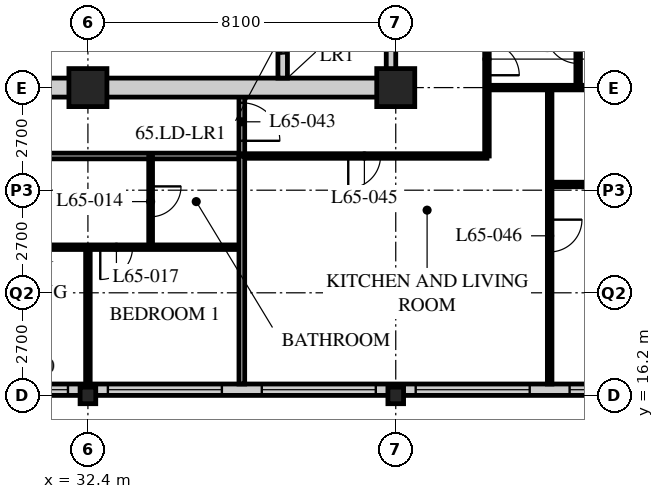
"""IFC4 building model, lengths in metres.
Left out: names, types, materials, properties, quantities, classifications, styles, units other than length and angle.
Written with IfcOpenShell. Run it as: python <this file> out.ifc"""

import sys

from ifc_helpers import new_model, si_unit, direction, frame, frame_2d, origin, origin_2d, place, context, subcontext, project, spatial, rectangle, hollow_rectangle, i_section, extrude, element, fill, save


model = new_model("IFC4")
c1 = context("Model", 3, precision=1e-05, world=origin(), true_north=direction((0.0, 1.0)))
c2 = subcontext(c1, "Body", "Model", "MODEL_VIEW")
j1 = project(units=[si_unit("LENGTHUNIT", "METRE"), si_unit("PLANEANGLEUNIT", "RADIAN")], contexts=[c1])
p1 = place(None, origin())
s1 = spatial("IfcSite", under=j1, at=p1, CompositionType="ELEMENT")
p2 = place(p1, origin())
s2 = spatial("IfcBuilding", under=s1, at=p2, CompositionType="ELEMENT")
p3 = place(p2, frame((0.0, 0.0, 254.1)))
s3 = spatial("IfcBuildingStorey", under=s2, at=p3, CompositionType="ELEMENT", Elevation=254.1)
p4 = place(p3, frame((32.4, 16.2, 0.0), z_axis=(0.0, 0.0, 1.0), x_axis=(1.0, 0.0, 0.0)))
e1 = element("IfcColumn", 1, at=p4, inside=s3, PredefinedType="COLUMN", context=c2, shape_type="SweptSolid", body=[
    extrude(i_section(OverallWidth=0.412, OverallDepth=0.437, WebThickness=0.036, FlangeThickness=0.058, FilletRadius=0.015, at=origin_2d()), origin(), (0.0, 0.0, 1.0), 3.9),
])
p5 = place(p3, frame((32.4, 24.3, 0.0), z_axis=(0.0, 0.0, 1.0), x_axis=(1.0, 0.0, 0.0)))
e2 = element("IfcColumn", 2, at=p5, inside=s3, PredefinedType="COLUMN", context=c2, shape_type="SweptSolid", body=[
    extrude(hollow_rectangle(XDim=1.0, YDim=1.0, WallThickness=0.1, at=origin_2d()), origin(), (0.0, 0.0, 1.0), 3.9),
])
p6 = place(p3, frame((40.5, 16.2, 0.0), z_axis=(0.0, 0.0, 1.0), x_axis=(1.0, 0.0, 0.0)))
e3 = element("IfcColumn", 3, at=p6, inside=s3, PredefinedType="COLUMN", context=c2, shape_type="SweptSolid", body=[
    extrude(i_section(OverallWidth=0.412, OverallDepth=0.437, WebThickness=0.036, FlangeThickness=0.058, FilletRadius=0.015, at=origin_2d()), origin(), (0.0, 0.0, 1.0), 3.9),
])
p7 = place(p3, frame((40.5, 24.3, 0.0), z_axis=(0.0, 0.0, 1.0), x_axis=(1.0, 0.0, 0.0)))
e4 = element("IfcColumn", 4, at=p7, inside=s3, PredefinedType="COLUMN", context=c2, shape_type="SweptSolid", body=[
    extrude(hollow_rectangle(XDim=1.0, YDim=1.0, WallThickness=0.1, at=origin_2d()), origin(), (0.0, 0.0, 1.0), 3.9),
])
p8 = place(p3, frame((8.4, 16.35, 0.0), z_axis=(0.0, 0.0, 1.0), x_axis=(1.0, 0.0, 0.0)))
e5 = element("IfcWall", 5, at=p8, inside=s3, PredefinedType="SOLIDWALL", context=c2, shape_type="SweptSolid", body=[
    extrude(rectangle(XDim=40.2, YDim=0.3, at=frame_2d((20.1, 0.0))), origin(), (0.0, 0.0, 1.0), 3.69),
])
p9 = place(p8, frame((0.225, 0.0, 0.6)))
e6 = element("IfcOpeningElement", 6, at=p9, cuts=e5, PredefinedType="OPENING", context=c2, shape_type="SweptSolid", body=[
    extrude(rectangle(XDim=3.0, YDim=2.4, at=frame_2d((1.5, 1.2))), frame((0.0, 0.16, 0.0), z_axis=(0.0, -1.0, 0.0), x_axis=(1.0, 0.0, 0.0)), (0.0, 0.0, 1.0), 0.32),
])
p10 = place(p8, frame((4.275, 0.0, 0.6)))
e7 = element("IfcOpeningElement", 7, at=p10, cuts=e5, PredefinedType="OPENING", context=c2, shape_type="SweptSolid", body=[
    extrude(rectangle(XDim=3.0, YDim=2.4, at=frame_2d((1.5, 1.2))), frame((0.0, 0.16, 0.0), z_axis=(0.0, -1.0, 0.0), x_axis=(1.0, 0.0, 0.0)), (0.0, 0.0, 1.0), 0.32),
])
p11 = place(p8, frame((8.325, 0.0, 0.6)))
e8 = element("IfcOpeningElement", 8, at=p11, cuts=e5, PredefinedType="OPENING", context=c2, shape_type="SweptSolid", body=[
    extrude(rectangle(XDim=3.0, YDim=2.4, at=frame_2d((1.5, 1.2))), frame((0.0, 0.16, 0.0), z_axis=(0.0, -1.0, 0.0), x_axis=(1.0, 0.0, 0.0)), (0.0, 0.0, 1.0), 0.32),
])
p12 = place(p8, frame((12.375, 0.0, 0.6)))
e9 = element("IfcOpeningElement", 9, at=p12, cuts=e5, PredefinedType="OPENING", context=c2, shape_type="SweptSolid", body=[
    extrude(rectangle(XDim=3.0, YDim=2.4, at=frame_2d((1.5, 1.2))), frame((0.0, 0.16, 0.0), z_axis=(0.0, -1.0, 0.0), x_axis=(1.0, 0.0, 0.0)), (0.0, 0.0, 1.0), 0.32),
])
p13 = place(p8, frame((16.425, 0.0, 0.6)))
e10 = element("IfcOpeningElement", 10, at=p13, cuts=e5, PredefinedType="OPENING", context=c2, shape_type="SweptSolid", body=[
    extrude(rectangle(XDim=3.0, YDim=2.4, at=frame_2d((1.5, 1.2))), frame((0.0, 0.16, 0.0), z_axis=(0.0, -1.0, 0.0), x_axis=(1.0, 0.0, 0.0)), (0.0, 0.0, 1.0), 0.32),
])
p14 = place(p8, frame((20.475, 0.0, 0.6)))
e11 = element("IfcOpeningElement", 11, at=p14, cuts=e5, PredefinedType="OPENING", context=c2, shape_type="SweptSolid", body=[
    extrude(rectangle(XDim=3.0, YDim=2.4, at=frame_2d((1.5, 1.2))), frame((0.0, 0.16, 0.0), z_axis=(0.0, -1.0, 0.0), x_axis=(1.0, 0.0, 0.0)), (0.0, 0.0, 1.0), 0.32),
])
p15 = place(p8, frame((24.525, 0.0, 0.6)))
e12 = element("IfcOpeningElement", 12, at=p15, cuts=e5, PredefinedType="OPENING", context=c2, shape_type="SweptSolid", body=[
    extrude(rectangle(XDim=3.0, YDim=2.4, at=frame_2d((1.5, 1.2))), frame((0.0, 0.16, 0.0), z_axis=(0.0, -1.0, 0.0), x_axis=(1.0, 0.0, 0.0)), (0.0, 0.0, 1.0), 0.32),
])
p16 = place(p8, frame((28.575, 0.0, 0.6)))
e13 = element("IfcOpeningElement", 13, at=p16, cuts=e5, PredefinedType="OPENING", context=c2, shape_type="SweptSolid", body=[
    extrude(rectangle(XDim=3.0, YDim=2.4, at=frame_2d((1.5, 1.2))), frame((0.0, 0.16, 0.0), z_axis=(0.0, -1.0, 0.0), x_axis=(1.0, 0.0, 0.0)), (0.0, 0.0, 1.0), 0.32),
])
p17 = place(p8, frame((32.625, 0.0, 0.6)))
e14 = element("IfcOpeningElement", 14, at=p17, cuts=e5, PredefinedType="OPENING", context=c2, shape_type="SweptSolid", body=[
    extrude(rectangle(XDim=3.0, YDim=2.4, at=frame_2d((1.5, 1.2))), frame((0.0, 0.16, 0.0), z_axis=(0.0, -1.0, 0.0), x_axis=(1.0, 0.0, 0.0)), (0.0, 0.0, 1.0), 0.32),
])
p18 = place(p8, frame((36.675, 0.0, 0.6)))
e15 = element("IfcOpeningElement", 15, at=p18, cuts=e5, PredefinedType="OPENING", context=c2, shape_type="SweptSolid", body=[
    extrude(rectangle(XDim=3.0, YDim=2.4, at=frame_2d((1.5, 1.2))), frame((0.0, 0.16, 0.0), z_axis=(0.0, -1.0, 0.0), x_axis=(1.0, 0.0, 0.0)), (0.0, 0.0, 1.0), 0.32),
])
p19 = place(p3, frame((12.15, 22.5, 0.0), z_axis=(0.0, 0.0, 1.0), x_axis=(1.0, 0.0, 0.0)))
e16 = element("IfcWall", 16, at=p19, inside=s3, PredefinedType="PARTITIONING", context=c2, shape_type="SweptSolid", body=[
    extrude(rectangle(XDim=24.3, YDim=0.15, at=frame_2d((12.15, 0.0))), origin(), (0.0, 0.0, 1.0), 3.69),
])
p20 = place(p19, frame((6.4, 0.0, 0.0)))
e17 = element("IfcOpeningElement", 17, at=p20, cuts=e16, PredefinedType="OPENING", context=c2, shape_type="SweptSolid", body=[
    extrude(rectangle(XDim=1.0, YDim=2.1, at=frame_2d((0.5, 1.05))), frame((0.0, 0.085, 0.0), z_axis=(0.0, -1.0, 0.0), x_axis=(1.0, 0.0, 0.0)), (0.0, 0.0, 1.0), 0.17),
])
p21 = place(p19, frame((8.5, 0.0, 0.0)))
e18 = element("IfcOpeningElement", 18, at=p21, cuts=e16, PredefinedType="OPENING", context=c2, shape_type="SweptSolid", body=[
    extrude(rectangle(XDim=1.0, YDim=2.1, at=frame_2d((0.5, 1.05))), frame((0.0, 0.085, 0.0), z_axis=(0.0, -1.0, 0.0), x_axis=(1.0, 0.0, 0.0)), (0.0, 0.0, 1.0), 0.17),
])
p22 = place(p19, frame((16.6, 0.0, 0.0)))
e19 = element("IfcOpeningElement", 19, at=p22, cuts=e16, PredefinedType="OPENING", context=c2, shape_type="SweptSolid", body=[
    extrude(rectangle(XDim=1.0, YDim=2.1, at=frame_2d((0.5, 1.05))), frame((0.0, 0.085, 0.0), z_axis=(0.0, -1.0, 0.0), x_axis=(1.0, 0.0, 0.0)), (0.0, 0.0, 1.0), 0.17),
])
p23 = place(p19, frame((2.625, 0.0, 0.0)))
e20 = element("IfcOpeningElement", 20, at=p23, cuts=e16, PredefinedType="OPENING", context=c2, shape_type="SweptSolid", body=[
    extrude(rectangle(XDim=1.0, YDim=2.1, at=frame_2d((0.5, 1.05))), frame((0.0, 0.085, 0.0), z_axis=(0.0, -1.0, 0.0), x_axis=(1.0, 0.0, 0.0)), (0.0, 0.0, 1.0), 0.17),
])
p24 = place(p3, frame((36.45, 22.5, 0.0), z_axis=(0.0, 0.0, 1.0), x_axis=(0.0, 1.0, 0.0)))
e21 = element("IfcWall", 21, at=p24, inside=s3, PredefinedType="PARTITIONING", context=c2, shape_type="SweptSolid", body=[
    extrude(rectangle(XDim=1.8, YDim=0.15, at=frame_2d((0.9, 0.0))), origin(), (0.0, 0.0, 1.0), 3.69),
])
p25 = place(p24, frame((0.4, 0.0, 0.0)))
e22 = element("IfcOpeningElement", 22, at=p25, cuts=e21, PredefinedType="OPENING", context=c2, shape_type="SweptSolid", body=[
    extrude(rectangle(XDim=1.0, YDim=2.1, at=frame_2d((0.5, 1.05))), frame((0.0, 0.085, 0.0), z_axis=(0.0, -1.0, 0.0), x_axis=(1.0, 0.0, 0.0)), (0.0, 0.0, 1.0), 0.17),
])
p26 = place(p3, frame((20.25, 20.1, 0.0), z_axis=(0.0, 0.0, 1.0), x_axis=(1.0, 0.0, 0.0)))
e23 = element("IfcWall", 23, at=p26, inside=s3, PredefinedType="PARTITIONING", context=c2, shape_type="SweptSolid", body=[
    extrude(rectangle(XDim=16.2, YDim=0.12, at=frame_2d((8.1, 0.0))), origin(), (0.0, 0.0, 1.0), 3.69),
])
p27 = place(p26, frame((0.975, 0.0, 0.0)))
e24 = element("IfcOpeningElement", 24, at=p27, cuts=e23, PredefinedType="OPENING", context=c2, shape_type="SweptSolid", body=[
    extrude(rectangle(XDim=0.85, YDim=2.1, at=frame_2d((0.425, 1.05))), frame((0.0, 0.07, 0.0), z_axis=(0.0, -1.0, 0.0), x_axis=(1.0, 0.0, 0.0)), (0.0, 0.0, 1.0), 0.14),
])
p28 = place(p26, frame((4.375, 0.0, 0.0)))
e25 = element("IfcOpeningElement", 25, at=p28, cuts=e23, PredefinedType="OPENING", context=c2, shape_type="SweptSolid", body=[
    extrude(rectangle(XDim=0.85, YDim=2.1, at=frame_2d((0.425, 1.05))), frame((0.0, 0.07, 0.0), z_axis=(0.0, -1.0, 0.0), x_axis=(1.0, 0.0, 0.0)), (0.0, 0.0, 1.0), 0.14),
])
p29 = place(p26, frame((9.075, 0.0, 0.0)))
e26 = element("IfcOpeningElement", 26, at=p29, cuts=e23, PredefinedType="OPENING", context=c2, shape_type="SweptSolid", body=[
    extrude(rectangle(XDim=0.85, YDim=2.1, at=frame_2d((0.425, 1.05))), frame((0.0, 0.07, 0.0), z_axis=(0.0, -1.0, 0.0), x_axis=(1.0, 0.0, 0.0)), (0.0, 0.0, 1.0), 0.14),
])
p30 = place(p26, frame((12.475, 0.0, 0.0)))
e27 = element("IfcOpeningElement", 27, at=p30, cuts=e23, PredefinedType="OPENING", context=c2, shape_type="SweptSolid", body=[
    extrude(rectangle(XDim=0.85, YDim=2.1, at=frame_2d((0.425, 1.05))), frame((0.0, 0.07, 0.0), z_axis=(0.0, -1.0, 0.0), x_axis=(1.0, 0.0, 0.0)), (0.0, 0.0, 1.0), 0.14),
])
p31 = place(p3, frame((34.05, 22.5, 0.0), z_axis=(0.0, 0.0, 1.0), x_axis=(0.0, -1.0, 0.0)))
e28 = element("IfcWall", 28, at=p31, inside=s3, PredefinedType="PARTITIONING", context=c2, shape_type="SweptSolid", body=[
    extrude(rectangle(XDim=2.4, YDim=0.1, at=frame_2d((1.2, 0.0))), origin(), (0.0, 0.0, 1.0), 3.69),
])
p32 = place(p31, frame((0.8, 0.0, 0.0)))
e29 = element("IfcOpeningElement", 29, at=p32, cuts=e28, PredefinedType="OPENING", context=c2, shape_type="SweptSolid", body=[
    extrude(rectangle(XDim=0.8, YDim=2.1, at=frame_2d((0.4, 1.05))), frame((0.0, 0.06, 0.0), z_axis=(0.0, -1.0, 0.0), x_axis=(1.0, 0.0, 0.0)), (0.0, 0.0, 1.0), 0.12),
])
p33 = place(p3, frame((32.4, 20.1, 0.0), z_axis=(0.0, 0.0, 1.0), x_axis=(0.0, -1.0, 0.0)))
e30 = element("IfcWall", 30, at=p33, inside=s3, PredefinedType="PARTITIONING", context=c2, shape_type="SweptSolid", body=[
    extrude(rectangle(XDim=3.6, YDim=0.12, at=frame_2d((1.8, 0.0))), origin(), (0.0, 0.0, 1.0), 3.078),
])
p34 = place(p3, frame((42.9, 22.5, 0.0), z_axis=(0.0, 0.0, 1.0), x_axis=(0.0, 1.0, 0.0)))
e31 = element("IfcWall", 31, at=p34, inside=s3, PredefinedType="PARTITIONING", context=c2, shape_type="SweptSolid", body=[
    extrude(rectangle(XDim=13.95, YDim=0.12, at=frame_2d((6.975, 0.0))), origin(), (0.0, 0.0, 1.0), 3.69),
])
p35 = place(p34, frame((2.125, 0.0, 0.0)))
e32 = element("IfcOpeningElement", 32, at=p35, cuts=e31, PredefinedType="OPENING", context=c2, shape_type="SweptSolid", body=[
    extrude(rectangle(XDim=0.85, YDim=2.1, at=frame_2d((0.425, 1.05))), frame((0.0, 0.07, 0.0), z_axis=(0.0, -1.0, 0.0), x_axis=(1.0, 0.0, 0.0)), (0.0, 0.0, 1.0), 0.14),
])
p36 = place(p34, frame((6.175, 0.0, 0.0)))
e33 = element("IfcOpeningElement", 33, at=p36, cuts=e31, PredefinedType="OPENING", context=c2, shape_type="SweptSolid", body=[
    extrude(rectangle(XDim=0.85, YDim=2.1, at=frame_2d((0.425, 1.05))), frame((0.0, 0.07, 0.0), z_axis=(0.0, -1.0, 0.0), x_axis=(1.0, 0.0, 0.0)), (0.0, 0.0, 1.0), 0.14),
])
p37 = place(p34, frame((10.225, 0.0, 0.0)))
e34 = element("IfcOpeningElement", 34, at=p37, cuts=e31, PredefinedType="OPENING", context=c2, shape_type="SweptSolid", body=[
    extrude(rectangle(XDim=0.85, YDim=2.1, at=frame_2d((0.425, 1.05))), frame((0.0, 0.07, 0.0), z_axis=(0.0, -1.0, 0.0), x_axis=(1.0, 0.0, 0.0)), (0.0, 0.0, 1.0), 0.14),
])
p38 = place(p3, frame((36.45, 22.5, 0.0), z_axis=(0.0, 0.0, 1.0), x_axis=(1.0, 0.0, 0.0)))
e35 = element("IfcWall", 35, at=p38, inside=s3, PredefinedType="PARTITIONING", context=c2, shape_type="SweptSolid", body=[
    extrude(rectangle(XDim=6.45, YDim=0.12, at=frame_2d((3.225, 0.0))), origin(), (0.0, 0.0, 1.0), 3.69),
])
p39 = place(p38, frame((2.8, 0.0, 0.0)))
e36 = element("IfcOpeningElement", 36, at=p39, cuts=e35, PredefinedType="OPENING", context=c2, shape_type="SweptSolid", body=[
    extrude(rectangle(XDim=0.85, YDim=2.1, at=frame_2d((0.425, 1.05))), frame((0.0, 0.07, 0.0), z_axis=(0.0, -1.0, 0.0), x_axis=(1.0, 0.0, 0.0)), (0.0, 0.0, 1.0), 0.14),
])
p40 = place(p3, frame((42.9, 24.3, 0.0), z_axis=(0.0, 0.0, 1.0), x_axis=(1.0, 0.0, 0.0)))
e37 = element("IfcWall", 37, at=p40, inside=s3, PredefinedType="PARTITIONING", context=c2, shape_type="SweptSolid", body=[
    extrude(rectangle(XDim=9.45, YDim=0.12, at=frame_2d((4.725, 0.0))), origin(), (0.0, 0.0, 1.0), 3.078),
])
p41 = place(p3, frame((36.45, 16.5, 0.0), z_axis=(0.0, 0.0, 1.0), x_axis=(0.0, 1.0, 0.0)))
e38 = element("IfcWall", 38, at=p41, inside=s3, PredefinedType="PARTITIONING", context=c2, shape_type="SweptSolid", body=[
    extrude(rectangle(XDim=6.0, YDim=0.15, at=frame_2d((3.0, 0.0))), origin(), (0.0, 0.0, 1.0), 3.69),
])
p42 = place(p3, frame((44.55, 16.5, 0.0), z_axis=(0.0, 0.0, 1.0), x_axis=(0.0, 1.0, 0.0)))
e39 = element("IfcWall", 39, at=p42, inside=s3, PredefinedType="PARTITIONING", context=c2, shape_type="SweptSolid", body=[
    extrude(rectangle(XDim=7.8, YDim=0.12, at=frame_2d((3.9, 0.0))), origin(), (0.0, 0.0, 1.0), 3.69),
])
p43 = place(p42, frame((3.475, 0.0, 0.0)))
e40 = element("IfcOpeningElement", 40, at=p43, cuts=e39, PredefinedType="OPENING", context=c2, shape_type="SweptSolid", body=[
    extrude(rectangle(XDim=0.85, YDim=2.1, at=frame_2d((0.425, 1.05))), frame((0.0, 0.07, 0.0), z_axis=(0.0, -1.0, 0.0), x_axis=(1.0, 0.0, 0.0)), (0.0, 0.0, 1.0), 0.14),
])
p44 = place(p3, frame((45.3, 24.3, 0.0), z_axis=(0.0, 0.0, 1.0), x_axis=(0.0, 1.0, 0.0)))
e41 = element("IfcWall", 41, at=p44, inside=s3, PredefinedType="PARTITIONING", context=c2, shape_type="SweptSolid", body=[
    extrude(rectangle(XDim=1.76, YDim=0.12, at=frame_2d((0.88, 0.0))), origin(), (0.0, 0.0, 1.0), 3.69),
])
p45 = place(p44, frame((0.635, 0.0, 0.0)))
e42 = element("IfcOpeningElement", 42, at=p45, cuts=e41, PredefinedType="OPENING", context=c2, shape_type="SweptSolid", body=[
    extrude(rectangle(XDim=0.85, YDim=2.1, at=frame_2d((0.425, 1.05))), frame((0.0, 0.07, 0.0), z_axis=(0.0, -1.0, 0.0), x_axis=(1.0, 0.0, 0.0)), (0.0, 0.0, 1.0), 0.14),
])
p46 = place(p3, frame((44.55, 21.75, 0.0), z_axis=(0.0, 0.0, 1.0), x_axis=(1.0, 0.0, 0.0)))
e43 = element("IfcWall", 43, at=p46, inside=s3, PredefinedType="PARTITIONING", context=c2, shape_type="SweptSolid", body=[
    extrude(rectangle(XDim=7.8, YDim=0.12, at=frame_2d((3.9, 0.0))), origin(), (0.0, 0.0, 1.0), 3.69),
])
p47 = place(p46, frame((3.475, 0.0, 0.0)))
e44 = element("IfcOpeningElement", 44, at=p47, cuts=e43, PredefinedType="OPENING", context=c2, shape_type="SweptSolid", body=[
    extrude(rectangle(XDim=0.85, YDim=2.1, at=frame_2d((0.425, 1.05))), frame((0.0, 0.07, 0.0), z_axis=(0.0, -1.0, 0.0), x_axis=(1.0, 0.0, 0.0)), (0.0, 0.0, 1.0), 0.14),
])
p48 = place(p3, frame((15.95, 24.3, 0.0), z_axis=(0.0, 0.0, 1.0), x_axis=(1.0, 0.0, 0.0)))
e45 = element("IfcWall", 45, at=p48, inside=s3, PredefinedType="SOLIDWALL", context=c2, shape_type="SweptSolid", body=[
    extrude(rectangle(XDim=24.55, YDim=0.5, at=frame_2d((12.275, 0.0))), origin(), (0.0, 0.0, 1.0), 3.04),
])
p49 = place(p48, frame((11.5, 0.0, 0.0)))
e46 = element("IfcOpeningElement", 46, at=p49, cuts=e45, PredefinedType="OPENING", context=c2, shape_type="SweptSolid", body=[
    extrude(rectangle(XDim=1.8, YDim=2.4, at=frame_2d((0.9, 1.2))), frame((0.0, 0.26, 0.0), z_axis=(0.0, -1.0, 0.0), x_axis=(1.0, 0.0, 0.0)), (0.0, 0.0, 1.0), 0.52),
])
p50 = place(p3, frame((40.375, 24.55, 0.0), z_axis=(0.0, 0.0, 1.0), x_axis=(0.0, 1.0, 0.0)))
e47 = element("IfcWall", 47, at=p50, inside=s3, PredefinedType="SOLIDWALL", context=c2, shape_type="SweptSolid", body=[
    extrude(rectangle(XDim=15.7, YDim=0.25, at=frame_2d((7.85, 0.0))), origin(), (0.0, 0.0, 1.0), 3.078),
])
p51 = place(p3, frame((37.525, 24.55, 0.0), z_axis=(0.0, 0.0, 1.0), x_axis=(0.0, 1.0, 0.0)))
e48 = element("IfcWall", 48, at=p51, inside=s3, PredefinedType="SOLIDWALL", context=c2, shape_type="SweptSolid", body=[
    extrude(rectangle(XDim=7.75, YDim=0.25, at=frame_2d((3.875, 0.0))), origin(), (0.0, 0.0, 1.0), 3.69),
])
p52 = place(p51, frame((0.65, 0.0, 0.0)))
e49 = element("IfcOpeningElement", 49, at=p52, cuts=e48, PredefinedType="OPENING", context=c2, shape_type="SweptSolid", body=[
    extrude(rectangle(XDim=1.1, YDim=2.4, at=frame_2d((0.55, 1.2))), frame((0.0, 0.135, 0.0), z_axis=(0.0, -1.0, 0.0), x_axis=(1.0, 0.0, 0.0)), (0.0, 0.0, 1.0), 0.27),
])
p53 = place(p51, frame((3.25, 0.0, 0.0)))
e50 = element("IfcOpeningElement", 50, at=p53, cuts=e48, PredefinedType="OPENING", context=c2, shape_type="SweptSolid", body=[
    extrude(rectangle(XDim=1.1, YDim=2.4, at=frame_2d((0.55, 1.2))), frame((0.0, 0.135, 0.0), z_axis=(0.0, -1.0, 0.0), x_axis=(1.0, 0.0, 0.0)), (0.0, 0.0, 1.0), 0.27),
])
p54 = place(p51, frame((5.85, 0.0, 0.0)))
e51 = element("IfcOpeningElement", 51, at=p54, cuts=e48, PredefinedType="OPENING", context=c2, shape_type="SweptSolid", body=[
    extrude(rectangle(XDim=1.1, YDim=2.4, at=frame_2d((0.55, 1.2))), frame((0.0, 0.135, 0.0), z_axis=(0.0, -1.0, 0.0), x_axis=(1.0, 0.0, 0.0)), (0.0, 0.0, 1.0), 0.27),
])
p55 = place(p14, origin())
e52 = element("IfcWindow", 52, at=p55, inside=s3, PartitioningType="SINGLE_PANEL", PredefinedType="WINDOW", context=c2, shape_type="SweptSolid", body=[
    extrude(rectangle(XDim=3.0, YDim=2.4, at=frame_2d((1.5, 1.2))), frame((0.0, 0.03, 0.0), z_axis=(0.0, -1.0, 0.0), x_axis=(1.0, 0.0, 0.0)), (0.0, 0.0, 1.0), 0.06),
])
fill(e11, e52)
p56 = place(p15, origin())
e53 = element("IfcWindow", 53, at=p56, inside=s3, PartitioningType="SINGLE_PANEL", PredefinedType="WINDOW", context=c2, shape_type="SweptSolid", body=[
    extrude(rectangle(XDim=3.0, YDim=2.4, at=frame_2d((1.5, 1.2))), frame((0.0, 0.03, 0.0), z_axis=(0.0, -1.0, 0.0), x_axis=(1.0, 0.0, 0.0)), (0.0, 0.0, 1.0), 0.06),
])
fill(e12, e53)
p57 = place(p16, origin())
e54 = element("IfcWindow", 54, at=p57, inside=s3, PartitioningType="SINGLE_PANEL", PredefinedType="WINDOW", context=c2, shape_type="SweptSolid", body=[
    extrude(rectangle(XDim=3.0, YDim=2.4, at=frame_2d((1.5, 1.2))), frame((0.0, 0.03, 0.0), z_axis=(0.0, -1.0, 0.0), x_axis=(1.0, 0.0, 0.0)), (0.0, 0.0, 1.0), 0.06),
])
fill(e13, e54)
p58 = place(p17, origin())
e55 = element("IfcWindow", 55, at=p58, inside=s3, PartitioningType="SINGLE_PANEL", PredefinedType="WINDOW", context=c2, shape_type="SweptSolid", body=[
    extrude(rectangle(XDim=3.0, YDim=2.4, at=frame_2d((1.5, 1.2))), frame((0.0, 0.03, 0.0), z_axis=(0.0, -1.0, 0.0), x_axis=(1.0, 0.0, 0.0)), (0.0, 0.0, 1.0), 0.06),
])
fill(e14, e55)
p59 = place(p18, origin())
e56 = element("IfcWindow", 56, at=p59, inside=s3, PartitioningType="SINGLE_PANEL", PredefinedType="WINDOW", context=c2, shape_type="SweptSolid", body=[
    extrude(rectangle(XDim=3.0, YDim=2.4, at=frame_2d((1.5, 1.2))), frame((0.0, 0.03, 0.0), z_axis=(0.0, -1.0, 0.0), x_axis=(1.0, 0.0, 0.0)), (0.0, 0.0, 1.0), 0.06),
])
fill(e15, e56)
p60 = place(p32, origin())
e57 = element("IfcDoor", 57, at=p60, inside=s3, OperationType="SINGLE_SWING_LEFT", PredefinedType="DOOR", context=c2, shape_type="SweptSolid", body=[
    extrude(rectangle(XDim=0.8, YDim=2.1, at=frame_2d((0.4, 1.05))), frame((0.0, 0.025, 0.0), z_axis=(0.0, -1.0, 0.0), x_axis=(1.0, 0.0, 0.0)), (0.0, 0.0, 1.0), 0.05),
])
fill(e29, e57)
p61 = place(p30, origin())
e58 = element("IfcDoor", 58, at=p61, inside=s3, OperationType="SINGLE_SWING_RIGHT", PredefinedType="DOOR", context=c2, shape_type="SweptSolid", body=[
    extrude(rectangle(XDim=0.85, YDim=2.1, at=frame_2d((0.425, 1.05))), frame((0.0, 0.025, 0.0), z_axis=(0.0, -1.0, 0.0), x_axis=(1.0, 0.0, 0.0)), (0.0, 0.0, 1.0), 0.05),
])
fill(e27, e58)
p62 = place(p25, origin())
e59 = element("IfcDoor", 59, at=p62, inside=s3, OperationType="SINGLE_SWING_RIGHT", PredefinedType="DOOR", context=c2, shape_type="SweptSolid", body=[
    extrude(rectangle(XDim=1.0, YDim=2.1, at=frame_2d((0.5, 1.05))), frame((0.0, 0.025, 0.0), z_axis=(0.0, -1.0, 0.0), x_axis=(1.0, 0.0, 0.0)), (0.0, 0.0, 1.0), 0.05),
])
fill(e22, e59)
p63 = place(p39, origin())
e60 = element("IfcDoor", 60, at=p63, inside=s3, OperationType="SINGLE_SWING_RIGHT", PredefinedType="DOOR", context=c2, shape_type="SweptSolid", body=[
    extrude(rectangle(XDim=0.85, YDim=2.1, at=frame_2d((0.425, 1.05))), frame((0.0, 0.025, 0.0), z_axis=(0.0, -1.0, 0.0), x_axis=(1.0, 0.0, 0.0)), (0.0, 0.0, 1.0), 0.05),
])
fill(e36, e60)
p64 = place(p43, origin())
e61 = element("IfcDoor", 61, at=p64, inside=s3, OperationType="SINGLE_SWING_LEFT", PredefinedType="DOOR", context=c2, shape_type="SweptSolid", body=[
    extrude(rectangle(XDim=0.85, YDim=2.1, at=frame_2d((0.425, 1.05))), frame((0.0, 0.025, 0.0), z_axis=(0.0, -1.0, 0.0), x_axis=(1.0, 0.0, 0.0)), (0.0, 0.0, 1.0), 0.05),
])
fill(e40, e61)
p65 = place(p35, origin())
e62 = element("IfcDoor", 62, at=p65, inside=s3, OperationType="SINGLE_SWING_RIGHT", PredefinedType="DOOR", context=c2, shape_type="SweptSolid", body=[
    extrude(rectangle(XDim=0.85, YDim=2.1, at=frame_2d((0.425, 1.05))), frame((0.0, 0.025, 0.0), z_axis=(0.0, -1.0, 0.0), x_axis=(1.0, 0.0, 0.0)), (0.0, 0.0, 1.0), 0.05),
])
fill(e32, e62)
p66 = place(p45, origin())
e63 = element("IfcDoor", 63, at=p66, inside=s3, OperationType="SINGLE_SWING_RIGHT", PredefinedType="DOOR", context=c2, shape_type="SweptSolid", body=[
    extrude(rectangle(XDim=0.85, YDim=2.1, at=frame_2d((0.425, 1.05))), frame((0.0, 0.025, 0.0), z_axis=(0.0, -1.0, 0.0), x_axis=(1.0, 0.0, 0.0)), (0.0, 0.0, 1.0), 0.05),
])
fill(e42, e63)
p67 = place(p52, origin())
e64 = element("IfcDoor", 64, at=p67, inside=s3, OperationType="DOUBLE_DOOR_SLIDING", PredefinedType="DOOR", context=c2, shape_type="SweptSolid", body=[
    extrude(rectangle(XDim=1.1, YDim=2.4, at=frame_2d((0.55, 1.2))), frame((0.0, 0.025, 0.0), z_axis=(0.0, -1.0, 0.0), x_axis=(1.0, 0.0, 0.0)), (0.0, 0.0, 1.0), 0.05),
])
fill(e49, e64)
save(model, sys.argv[1])
